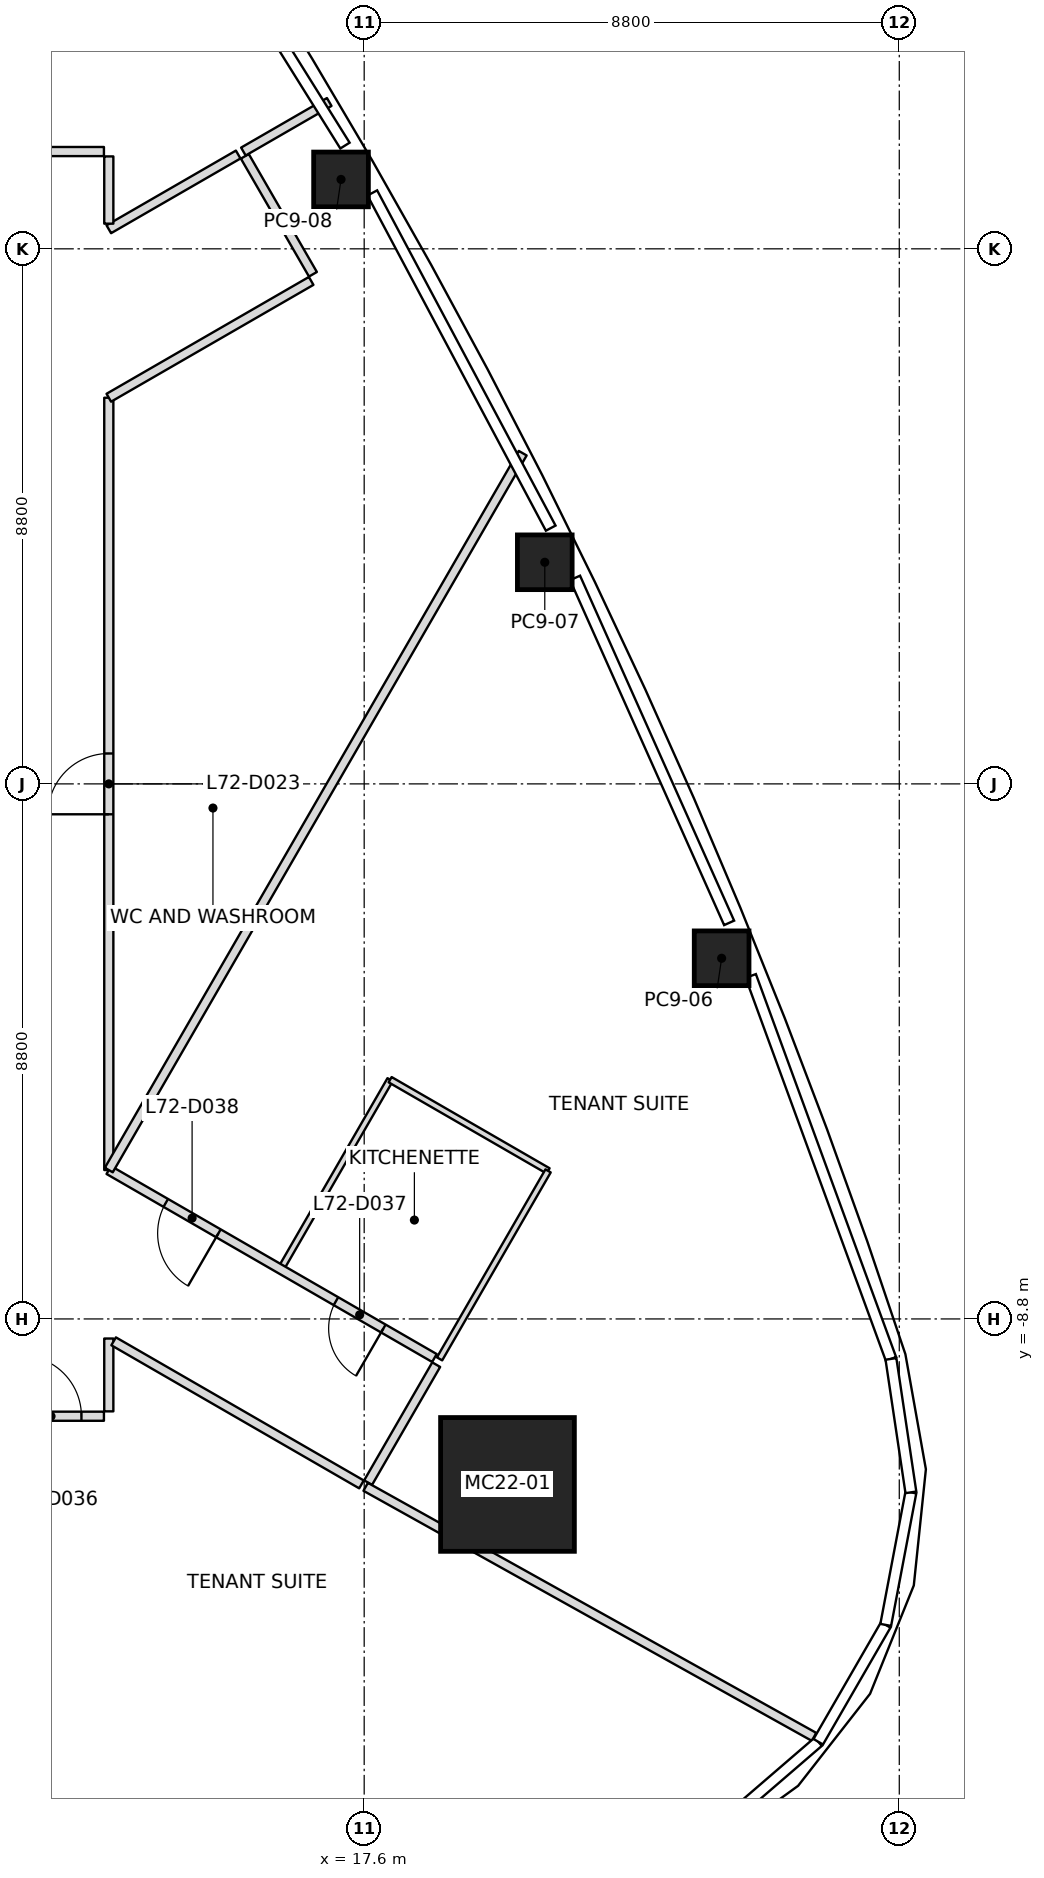
"""IFC4 building model, lengths in metres.
Left out: names, types, materials, properties, quantities, classifications, styles, units other than length and angle.
Written with IfcOpenShell. Run it as: python <this file> out.ifc"""

import sys

from ifc_helpers import new_model, si_unit, direction, frame, frame_2d, origin, origin_2d, place, context, subcontext, project, spatial, rectangle, extrude, clip, halfspace, element, fill, save


model = new_model("IFC4")
c1 = context("Model", 3, precision=1e-05, world=origin(), true_north=direction((0.0, 1.0)))
c2 = subcontext(c1, "Body", "Model", "MODEL_VIEW")
j1 = project(units=[si_unit("LENGTHUNIT", "METRE"), si_unit("PLANEANGLEUNIT", "RADIAN")], contexts=[c1])
p1 = place(None, origin())
s1 = spatial("IfcSite", under=j1, at=p1, CompositionType="ELEMENT")
p2 = place(p1, origin())
s2 = spatial("IfcBuilding", under=s1, at=p2, CompositionType="ELEMENT")
p3 = place(p2, frame((0.0, 0.0, 315.0)))
s3 = spatial("IfcBuildingStorey", under=s2, at=p3, CompositionType="ELEMENT", Elevation=315.0)
p4 = place(p3, frame((19.957, -11.522, 0.0), z_axis=(-0.027695790401, 0.015983033227, 0.999488612163), x_axis=(0.999616398022, 0.00044283261, 0.027692249912)))
e1 = element("IfcColumn", 1, at=p4, inside=s3, PredefinedType="COLUMN", context=c2, shape_type="SweptSolid", body=[
    clip(extrude(rectangle(XDim=2.2, YDim=2.2, at=origin_2d()), origin(), (0.0, 0.0, 1.0), 4.002), halfspace(frame((0.0, 0.0, 3.996)), False)),
])
p5 = place(p3, frame((23.479, -2.868, 0.0), z_axis=(-0.017696558482, 0.009885663704, 0.999794531627), x_axis=(-0.375914723165, 0.926519298073, -0.015814904541)))
e2 = element("IfcColumn", 2, at=p5, inside=s3, PredefinedType="COLUMN", context=c2, shape_type="SweptSolid", body=[
    clip(extrude(rectangle(XDim=0.9, YDim=0.9, at=origin_2d()), origin(), (0.0, 0.0, 1.0), 4.001), halfspace(frame((0.0, 0.0, 3.999)), False)),
])
p6 = place(p3, frame((20.57, 3.645, 0.0), z_axis=(-0.014036676147, 0.001952928855, 0.999899573853), x_axis=(-0.438991330539, 0.898456413276, -0.007917395706)))
e3 = element("IfcColumn", 3, at=p6, inside=s3, PredefinedType="COLUMN", context=c2, shape_type="SweptSolid", body=[
    clip(extrude(rectangle(XDim=0.9, YDim=0.9, at=origin_2d()), origin(), (0.0, 0.0, 1.0), 4.0), halfspace(frame((0.0, 0.0, 3.999)), False)),
])
p7 = place(p3, frame((17.219, 9.941, 0.0), z_axis=(-0.009887052741, -0.005675900648, 0.999935013058), x_axis=(-0.49997556095, 0.866039512773, -2.7732311e-05)))
e4 = element("IfcColumn", 4, at=p7, inside=s3, PredefinedType="COLUMN", context=c2, shape_type="SweptSolid", body=[
    clip(extrude(rectangle(XDim=0.9, YDim=0.9, at=origin_2d()), origin(), (0.0, 0.0, 1.0), 4.0), halfspace(frame((0.0, 0.0, 3.999)), False)),
])
p8 = place(p3, frame((13.4, -6.351, 0.0), z_axis=(0.0, 0.0, 1.0), x_axis=(0.500002396138, 0.866024020369, 0.0)))
e5 = element("IfcWall", 5, at=p8, inside=s3, PredefinedType="PARTITIONING", context=c2, shape_type="SweptSolid", body=[
    extrude(rectangle(XDim=13.614, YDim=0.15, at=frame_2d((6.807, 0.0))), origin(), (0.0, 0.0, 1.0), 3.234),
])
p9 = place(p3, frame((17.025, 11.215, 0.0), z_axis=(0.0, 0.0, 1.0), x_axis=(-0.865976063253, -0.500085450571, 0.0)))
e6 = element("IfcWall", 6, at=p9, inside=s3, PredefinedType="PARTITIONING", context=c2, shape_type="SweptSolid", body=[
    extrude(rectangle(XDim=1.63, YDim=0.15, at=frame_2d((0.815, 0.0))), origin(), (0.0, 0.0, 1.0), 3.234),
])
p10 = place(p3, frame((17.625, -11.561, 0.0), z_axis=(0.0, 0.0, 1.0), x_axis=(0.873370497539, -0.487056438238, 0.0)))
e7 = element("IfcWall", 7, at=p10, inside=s3, PredefinedType="PARTITIONING", context=c2, shape_type="SweptSolid", body=[
    extrude(rectangle(XDim=8.443, YDim=0.15, at=frame_2d((4.222, 0.0))), origin(), (0.0, 0.0, 1.0), 3.234),
])
p11 = place(p3, frame((1.2, -10.4, 0.0), z_axis=(0.0, 0.0, 1.0), x_axis=(1.0, 0.0, 0.0)))
e8 = element("IfcWall", 8, at=p11, inside=s3, PredefinedType="PARTITIONING", context=c2, shape_type="SweptSolid", body=[
    extrude(rectangle(XDim=12.12, YDim=0.15, at=frame_2d((6.06, 0.0))), origin(), (0.0, 0.0, 1.0), 3.393),
])
p12 = place(p11, frame((7.25, 0.0, 0.0)))
e9 = element("IfcOpeningElement", 9, at=p12, cuts=e8, PredefinedType="OPENING", context=c2, shape_type="SweptSolid", body=[
    extrude(rectangle(XDim=0.9, YDim=2.1, at=frame_2d((0.45, 1.05))), frame((0.0, 0.075, 0.0), z_axis=(0.0, -1.0, 0.0), x_axis=(1.0, 0.0, 0.0)), (0.0, 0.0, 1.0), 0.15),
])
p13 = place(p11, frame((10.75, 0.0, 0.0)))
e10 = element("IfcOpeningElement", 10, at=p13, cuts=e8, PredefinedType="OPENING", context=c2, shape_type="SweptSolid", body=[
    extrude(rectangle(XDim=1.0, YDim=2.1, at=frame_2d((0.5, 1.05))), frame((0.0, 0.075, 0.0), z_axis=(0.0, -1.0, 0.0), x_axis=(1.0, 0.0, 0.0)), (0.0, 0.0, 1.0), 0.15),
])
p14 = place(p3, frame((13.32, 10.4, 0.0), z_axis=(0.0, 0.0, 1.0), x_axis=(-1.0, 0.0, 0.0)))
e11 = element("IfcWall", 11, at=p14, inside=s3, PredefinedType="PARTITIONING", context=c2, shape_type="SweptSolid", body=[
    extrude(rectangle(XDim=5.12, YDim=0.15, at=frame_2d((2.56, 0.0))), origin(), (0.0, 0.0, 1.0), 3.443),
])
p15 = place(p14, frame((2.02, 0.0, 0.0)))
e12 = element("IfcOpeningElement", 12, at=p15, cuts=e11, PredefinedType="OPENING", context=c2, shape_type="SweptSolid", body=[
    extrude(rectangle(XDim=1.0, YDim=2.1, at=frame_2d((0.5, 1.05))), frame((0.0, 0.075, 0.0), z_axis=(0.0, -1.0, 0.0), x_axis=(1.0, 0.0, 0.0)), (0.0, 0.0, 1.0), 0.15),
])
p16 = place(p3, frame((13.4, -10.32, 0.0), z_axis=(0.0, 0.0, 1.0), x_axis=(0.0, 1.0, 0.0)))
e13 = element("IfcWall", 13, at=p16, inside=s3, PredefinedType="PARTITIONING", context=c2, shape_type="SweptSolid", body=[
    extrude(rectangle(XDim=1.198, YDim=0.15, at=frame_2d((0.599, 0.0))), origin(), (0.0, 0.0, 1.0), 3.233),
])
p17 = place(p3, frame((13.479, -9.168, 0.0), z_axis=(0.0, 0.0, 1.0), x_axis=(0.866035288455, -0.499982878858, 0.0)))
e14 = element("IfcWall", 14, at=p17, inside=s3, PredefinedType="PARTITIONING", context=c2, shape_type="SweptSolid", body=[
    extrude(rectangle(XDim=4.707, YDim=0.15, at=frame_2d((2.354, 0.0))), origin(), (0.0, 0.0, 1.0), 3.233),
])
p18 = place(p3, frame((13.4, -6.351, 0.0), z_axis=(0.0, 0.0, 1.0), x_axis=(0.0, 1.0, 0.0)))
e15 = element("IfcWall", 15, at=p18, inside=s3, PredefinedType="PARTITIONING", context=c2, shape_type="SweptSolid", body=[
    extrude(rectangle(XDim=12.702, YDim=0.15, at=frame_2d((6.351, 0.0))), origin(), (0.0, 0.0, 1.0), 3.317),
])
p19 = place(p18, frame((5.851, 0.0, 0.0)))
e16 = element("IfcOpeningElement", 16, at=p19, cuts=e15, PredefinedType="OPENING", context=c2, shape_type="SweptSolid", body=[
    extrude(rectangle(XDim=1.0, YDim=2.1, at=frame_2d((0.5, 1.05))), frame((0.0, 0.075, 0.0), z_axis=(0.0, -1.0, 0.0), x_axis=(1.0, 0.0, 0.0)), (0.0, 0.0, 1.0), 0.15),
])
p20 = place(p3, frame((13.4, 6.351, 0.0), z_axis=(0.0, 0.0, 1.0), x_axis=(0.866021594059, 0.50000659858, 0.0)))
e17 = element("IfcWall", 17, at=p20, inside=s3, PredefinedType="PARTITIONING", context=c2, shape_type="SweptSolid", body=[
    extrude(rectangle(XDim=3.843, YDim=0.15, at=frame_2d((1.921, 0.0))), origin(), (0.0, 0.0, 1.0), 3.45),
])
p21 = place(p3, frame((18.755, -9.443, 0.0), z_axis=(0.0, 0.0, 1.0), x_axis=(-0.866038319186, 0.499977629202, 0.0)))
e18 = element("IfcWall", 18, at=p21, inside=s3, PredefinedType="PARTITIONING", context=c2, shape_type="SweptSolid", body=[
    extrude(rectangle(XDim=6.184, YDim=0.15, at=frame_2d((3.092, 0.0))), origin(), (0.0, 0.0, 1.0), 3.317),
])
p22 = place(p21, frame((0.97, 0.0, 0.0)))
e19 = element("IfcOpeningElement", 19, at=p22, cuts=e18, PredefinedType="OPENING", context=c2, shape_type="SweptSolid", body=[
    extrude(rectangle(XDim=0.9, YDim=2.1, at=frame_2d((0.45, 1.05))), frame((0.0, 0.075, 0.0), z_axis=(0.0, -1.0, 0.0), x_axis=(1.0, 0.0, 0.0)), (0.0, 0.0, 1.0), 0.15),
])
p23 = place(p21, frame((4.102, 0.0, 0.0)))
e20 = element("IfcOpeningElement", 20, at=p23, cuts=e18, PredefinedType="OPENING", context=c2, shape_type="SweptSolid", body=[
    extrude(rectangle(XDim=1.0, YDim=2.1, at=frame_2d((0.5, 1.05))), frame((0.0, 0.075, 0.0), z_axis=(0.0, -1.0, 0.0), x_axis=(1.0, 0.0, 0.0)), (0.0, 0.0, 1.0), 0.15),
])
p24 = place(p3, frame((15.528, 10.351, 0.0), z_axis=(0.0, 0.0, 1.0), x_axis=(-0.866033360935, -0.499986217557, 0.0)))
e21 = element("IfcWall", 21, at=p24, inside=s3, PredefinedType="PARTITIONING", context=c2, shape_type="SweptSolid", body=[
    extrude(rectangle(XDim=2.457, YDim=0.15, at=frame_2d((1.229, 0.0))), origin(), (0.0, 0.0, 1.0), 3.45),
])
p25 = place(p3, frame((13.4, 9.214, 0.0), z_axis=(0.0, 0.0, 1.0), x_axis=(0.0, 1.0, 0.0)))
e22 = element("IfcWall", 22, at=p25, inside=s3, PredefinedType="PARTITIONING", context=c2, shape_type="SweptSolid", body=[
    extrude(rectangle(XDim=1.106, YDim=0.15, at=frame_2d((0.553, 0.0))), origin(), (0.0, 0.0, 1.0), 3.45),
])
p26 = place(p3, frame((16.757, 8.382, 0.0), z_axis=(0.0, 0.0, 1.0), x_axis=(-0.49999608499, 0.866027664105, 0.0)))
e23 = element("IfcWall", 23, at=p26, inside=s3, PredefinedType="PARTITIONING", context=c2, shape_type="SweptSolid", body=[
    extrude(rectangle(XDim=2.24, YDim=0.15, at=frame_2d((1.12, 0.0))), origin(), (0.0, 0.0, 1.0), 3.45),
])
p27 = place(p3, frame((17.665, -11.492, 0.0), z_axis=(0.0, 0.0, 1.0), x_axis=(0.49994888933, 0.866054910533, 0.0)))
e24 = element("IfcWall", 24, at=p27, inside=s3, PredefinedType="PARTITIONING", context=c2, shape_type="SweptSolid", body=[
    extrude(rectangle(XDim=2.24, YDim=0.15, at=frame_2d((1.12, 0.0))), origin(), (0.0, 0.0, 1.0), 3.233),
])
p28 = place(p3, frame((16.241, -7.957, 0.0), z_axis=(0.0, 0.0, 1.0), x_axis=(0.500022371132, 0.86601248742, 0.0)))
e25 = element("IfcWall", 25, at=p28, inside=s3, PredefinedType="PARTITIONING", context=c2, shape_type="SweptSolid", body=[
    extrude(rectangle(XDim=3.57, YDim=0.1, at=frame_2d((1.785, 0.0))), origin(), (0.0, 0.0, 1.0), 3.45),
])
p29 = place(p3, frame((18.027, -4.865, 0.0), z_axis=(0.0, 0.0, 1.0), x_axis=(0.866010750942, -0.50002537861, 0.0)))
e26 = element("IfcWall", 26, at=p29, inside=s3, PredefinedType="PARTITIONING", context=c2, shape_type="SweptSolid", body=[
    extrude(rectangle(XDim=3.0, YDim=0.1, at=frame_2d((1.5, 0.0))), origin(), (0.0, 0.0, 1.0), 3.443),
])
p30 = place(p3, frame((20.625, -6.365, 0.0), z_axis=(0.0, 0.0, 1.0), x_axis=(-0.499971082179, -0.866042098853, 0.0)))
e27 = element("IfcWall", 27, at=p30, inside=s3, PredefinedType="PARTITIONING", context=c2, shape_type="SweptSolid", body=[
    extrude(rectangle(XDim=3.57, YDim=0.1, at=frame_2d((1.785, 0.0))), origin(), (0.0, 0.0, 1.0), 3.45),
])
p31 = place(p19, origin())
e28 = element("IfcDoor", 28, at=p31, inside=s3, OperationType="SINGLE_SWING_RIGHT", PredefinedType="DOOR", context=c2, shape_type="SweptSolid", body=[
    extrude(rectangle(XDim=1.0, YDim=2.1, at=frame_2d((0.5, 1.05))), frame((0.0, 0.025, 0.0), z_axis=(0.0, -1.0, 0.0), x_axis=(1.0, 0.0, 0.0)), (0.0, 0.0, 1.0), 0.05),
])
fill(e16, e28)
p32 = place(p13, origin())
e29 = element("IfcDoor", 29, at=p32, inside=s3, OperationType="SINGLE_SWING_RIGHT", PredefinedType="DOOR", context=c2, shape_type="SweptSolid", body=[
    extrude(rectangle(XDim=1.0, YDim=2.1, at=frame_2d((0.5, 1.05))), frame((0.0, 0.025, 0.0), z_axis=(0.0, -1.0, 0.0), x_axis=(1.0, 0.0, 0.0)), (0.0, 0.0, 1.0), 0.05),
])
fill(e10, e29)
p33 = place(p22, origin())
e30 = element("IfcDoor", 30, at=p33, inside=s3, OperationType="SINGLE_SWING_LEFT", PredefinedType="DOOR", context=c2, shape_type="SweptSolid", body=[
    extrude(rectangle(XDim=0.9, YDim=2.1, at=frame_2d((0.45, 1.05))), frame((0.0, 0.025, 0.0), z_axis=(0.0, -1.0, 0.0), x_axis=(1.0, 0.0, 0.0)), (0.0, 0.0, 1.0), 0.05),
])
fill(e19, e30)
p34 = place(p23, origin())
e31 = element("IfcDoor", 31, at=p34, inside=s3, OperationType="SINGLE_SWING_LEFT", PredefinedType="DOOR", context=c2, shape_type="SweptSolid", body=[
    extrude(rectangle(XDim=1.0, YDim=2.1, at=frame_2d((0.5, 1.05))), frame((0.0, 0.025, 0.0), z_axis=(0.0, -1.0, 0.0), x_axis=(1.0, 0.0, 0.0)), (0.0, 0.0, 1.0), 0.05),
])
fill(e20, e31)
save(model, sys.argv[1])
